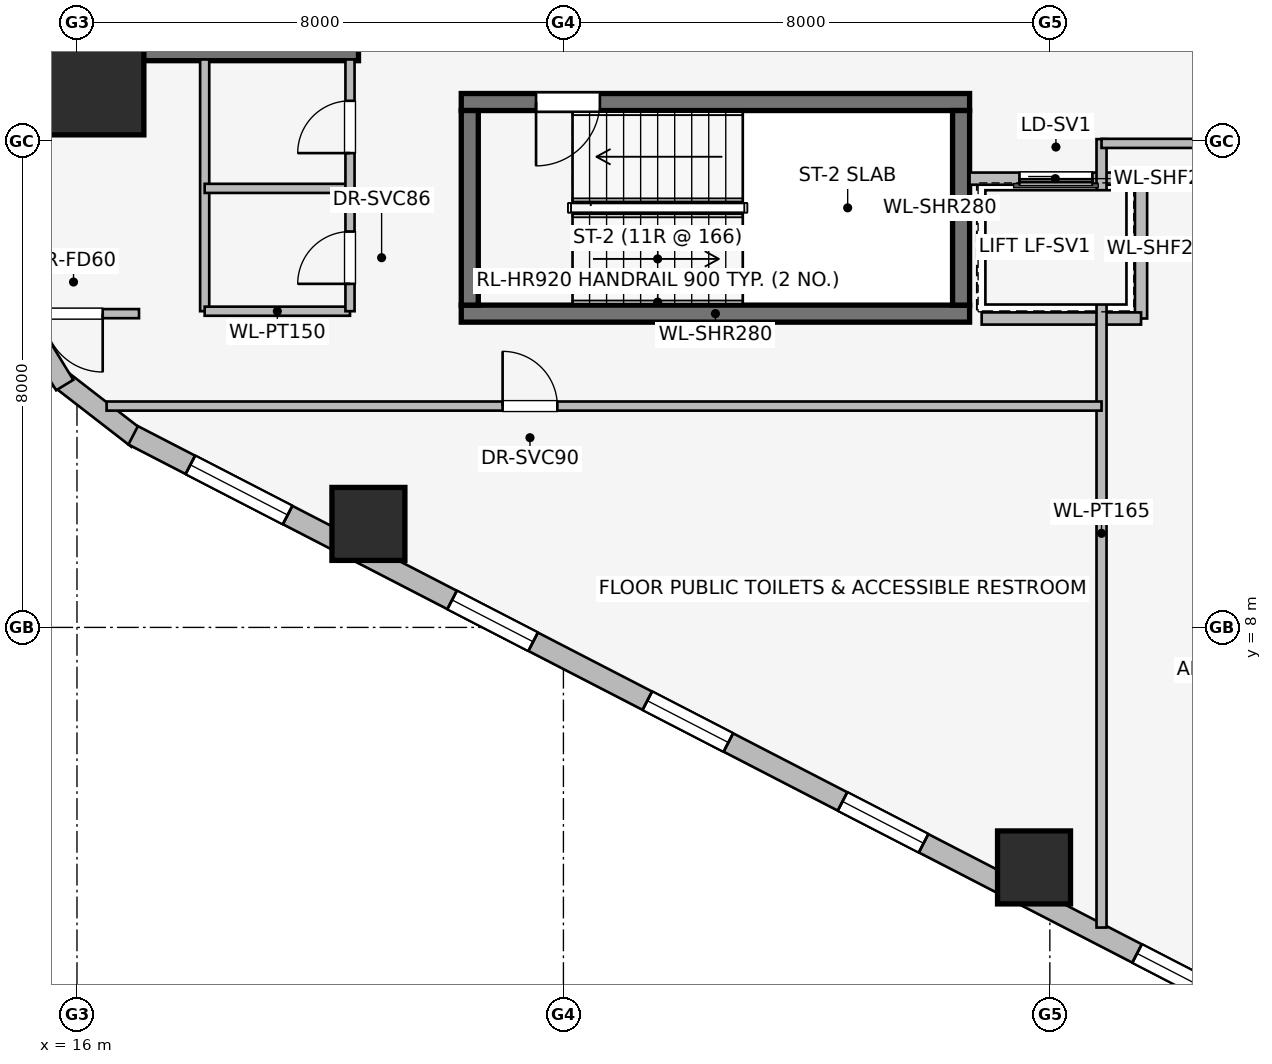
"""IFC4 building model, lengths in metres.
Left out: names, types, materials, properties, quantities, classifications, styles, units other than length and angle.
Written with IfcOpenShell. Run it as: python <this file> out.ifc"""

import sys

from ifc_helpers import new_model, si_unit, direction, frame, frame_2d, origin, origin_2d, place, context, subcontext, project, spatial, rectangle, extrude, element, fill, save


model = new_model("IFC4")
c1 = context("Model", 3, precision=1e-05, world=origin(), true_north=direction((0.0, 1.0)))
c2 = subcontext(c1, "Body", "Model", "MODEL_VIEW")
j1 = project(units=[si_unit("LENGTHUNIT", "METRE"), si_unit("PLANEANGLEUNIT", "RADIAN")], contexts=[c1])
p1 = place(None, origin())
s1 = spatial("IfcSite", under=j1, at=p1, CompositionType="ELEMENT")
p2 = place(p1, origin())
s2 = spatial("IfcBuilding", under=s1, at=p2, CompositionType="ELEMENT")
p3 = place(p2, frame((0.0, 0.0, 67.15)))
s3 = spatial("IfcBuildingStorey", under=s2, at=p3, CompositionType="ELEMENT", Elevation=67.15)
p4 = place(p3, frame((16.87, 17.46, 0.0), z_axis=(0.0, 0.0, 1.0), x_axis=(1.0, 0.0, 0.0)))
e1 = element("IfcWall", 1, at=p4, inside=s3, PredefinedType="SHEAR", context=c2, shape_type="SweptSolid", body=[
    extrude(rectangle(XDim=3.76, YDim=0.28, at=frame_2d((1.88, 0.0))), origin(), (0.0, 0.0, 1.0), 3.65),
])
p5 = place(p3, frame((22.32, 13.16, 0.0), z_axis=(0.0, 0.0, 1.0), x_axis=(1.0, 0.0, 0.0)))
e2 = element("IfcWall", 2, at=p5, inside=s3, PredefinedType="SHEAR", context=c2, shape_type="SweptSolid", body=[
    extrude(rectangle(XDim=8.36, YDim=0.28, at=frame_2d((4.18, 0.0))), origin(), (0.0, 0.0, 1.0), 3.65),
])
p6 = place(p3, frame((30.68, 16.64, 0.0), z_axis=(0.0, 0.0, 1.0), x_axis=(-1.0, 0.0, 0.0)))
e3 = element("IfcWall", 3, at=p6, inside=s3, PredefinedType="SHEAR", context=c2, shape_type="SweptSolid", body=[
    extrude(rectangle(XDim=8.36, YDim=0.28, at=frame_2d((4.18, 0.0))), origin(), (0.0, 0.0, 1.0), 3.65),
])
p7 = place(p6, frame((6.08, 0.0, 0.0)))
e4 = element("IfcOpeningElement", 4, at=p7, cuts=e3, PredefinedType="OPENING", context=c2, shape_type="SweptSolid", body=[
    extrude(rectangle(XDim=1.05, YDim=2.0, at=frame_2d((0.525, 1.0))), frame((0.0, 0.15, 0.0), z_axis=(0.0, -1.0, 0.0), x_axis=(1.0, 0.0, 0.0)), (0.0, 0.0, 1.0), 0.3),
])
for number, where, z_axis, x_axis in (
    (5, (22.46, 16.5, 0.0), (0.0, 0.0, 1.0), (0.0, -1.0, 0.0)),
    (6, (30.54, 13.3, 0.0), (0.0, 0.0, 1.0), (0.0, 1.0, 0.0)),
):
    element("IfcWall", number, at=place(p3, frame(where, z_axis=z_axis, x_axis=x_axis)), inside=s3, PredefinedType="SHEAR", context=c2, shape_type="SweptSolid", body=[
        extrude(rectangle(XDim=3.2, YDim=0.28, at=frame_2d((1.6, 0.0))), origin(), (0.0, 0.0, 1.0), 3.65),
    ])
p8 = place(p3, frame((16.3, 16.9, 0.0), z_axis=(0.0, 0.0, 1.0), x_axis=(1.0, 0.0, 0.0)))
e7 = element("IfcColumn", 7, at=p8, inside=s3, PredefinedType="COLUMN", context=c2, shape_type="SweptSolid", body=[
    extrude(rectangle(XDim=1.6, YDim=1.6, at=origin_2d()), origin(), (0.0, 0.0, 1.0), 3.65),
])
for number, where, z_axis, x_axis in (
    (8, (20.793, 9.702, 0.0), (0.0, 0.0, 1.0), (1.0, 0.0, 0.0)),
    (9, (31.74, 4.053, 0.0), (0.0, 0.0, 1.0), (1.0, 0.0, 0.0)),
):
    element("IfcColumn", number, at=place(p3, frame(where, z_axis=z_axis, x_axis=x_axis)), inside=s3, PredefinedType="COLUMN", context=c2, shape_type="SweptSolid", body=[
        extrude(rectangle(XDim=1.2, YDim=1.2, at=origin_2d()), origin(), (0.0, 0.0, 1.0), 3.65),
    ])
p9 = place(p3, frame((16.998, 11.099, 0.0), z_axis=(0.0, 0.0, 1.0), x_axis=(-0.790691856293, 0.61221433207, 0.0)))
e10 = element("IfcWall", 10, at=p9, inside=s3, PredefinedType="STANDARD", context=c2, shape_type="SweptSolid", body=[
    extrude(rectangle(XDim=1.676, YDim=0.33, at=frame_2d((0.838, 0.0))), origin(), (0.0, 0.0, 1.0), 3.39),
])
p10 = place(p3, frame((15.798, 11.985, 0.0), z_axis=(0.0, 0.0, 1.0), x_axis=(-0.520584129191, 0.853810379671, 0.0)))
e11 = element("IfcWall", 11, at=p10, inside=s3, PredefinedType="STANDARD", context=c2, shape_type="SweptSolid", body=[
    extrude(rectangle(XDim=1.677, YDim=0.33, at=frame_2d((0.838, 0.0))), origin(), (0.0, 0.0, 1.0), 3.39),
])
p11 = place(p3, frame((35.169, 1.743, 0.0), z_axis=(0.0, 0.0, 1.0), x_axis=(-0.888634413993, 0.458616264721, 0.0)))
e12 = element("IfcWall", 12, at=p11, inside=s3, PredefinedType="STANDARD", context=c2, shape_type="SweptSolid", body=[
    extrude(rectangle(XDim=20.531, YDim=0.34, at=frame_2d((10.266, 0.0))), origin(), (0.0, 0.0, 1.0), 2.684),
])
p12 = place(p11, frame((0.902, 0.0, 0.75)))
e13 = element("IfcOpeningElement", 13, at=p12, cuts=e12, PredefinedType="OPENING", context=c2, shape_type="SweptSolid", body=[
    extrude(rectangle(XDim=1.05, YDim=1.4, at=frame_2d((0.525, 0.7))), frame((0.0, 0.18, 0.0), z_axis=(0.0, -1.0, 0.0), x_axis=(1.0, 0.0, 0.0)), (0.0, 0.0, 1.0), 0.36),
])
p13 = place(p11, frame((5.903, 0.0, 0.75)))
e14 = element("IfcOpeningElement", 14, at=p13, cuts=e12, PredefinedType="OPENING", context=c2, shape_type="SweptSolid", body=[
    extrude(rectangle(XDim=1.5, YDim=1.5, at=frame_2d((0.75, 0.75))), frame((0.0, 0.18, 0.0), z_axis=(0.0, -1.0, 0.0), x_axis=(1.0, 0.0, 0.0)), (0.0, 0.0, 1.0), 0.36),
])
p14 = place(p11, frame((9.516, 0.0, 0.75)))
e15 = element("IfcOpeningElement", 15, at=p14, cuts=e12, PredefinedType="OPENING", context=c2, shape_type="SweptSolid", body=[
    extrude(rectangle(XDim=1.5, YDim=1.5, at=frame_2d((0.75, 0.75))), frame((0.0, 0.18, 0.0), z_axis=(0.0, -1.0, 0.0), x_axis=(1.0, 0.0, 0.0)), (0.0, 0.0, 1.0), 0.36),
])
p15 = place(p11, frame((13.129, 0.0, 0.75)))
e16 = element("IfcOpeningElement", 16, at=p15, cuts=e12, PredefinedType="OPENING", context=c2, shape_type="SweptSolid", body=[
    extrude(rectangle(XDim=1.5, YDim=1.5, at=frame_2d((0.75, 0.75))), frame((0.0, 0.18, 0.0), z_axis=(0.0, -1.0, 0.0), x_axis=(1.0, 0.0, 0.0)), (0.0, 0.0, 1.0), 0.36),
])
p16 = place(p11, frame((17.673, 0.0, 0.75)))
e17 = element("IfcOpeningElement", 17, at=p16, cuts=e12, PredefinedType="OPENING", context=c2, shape_type="SweptSolid", body=[
    extrude(rectangle(XDim=1.8, YDim=1.5, at=frame_2d((0.9, 0.75))), frame((0.0, 0.18, 0.0), z_axis=(0.0, -1.0, 0.0), x_axis=(1.0, 0.0, 0.0)), (0.0, 0.0, 1.0), 0.36),
])
p17 = place(p3, frame((33.5, 15.38, 0.0), z_axis=(0.0, 0.0, 1.0), x_axis=(-1.0, 0.0, 0.0)))
e18 = element("IfcWall", 18, at=p17, inside=s3, PredefinedType="PARTITIONING", context=c2, shape_type="SweptSolid", body=[
    extrude(rectangle(XDim=2.82, YDim=0.2, at=frame_2d((1.41, 0.0))), origin(), (0.0, 0.0, 1.0), 3.39),
])
p18 = place(p17, frame((0.8, 0.0, 0.0)))
e19 = element("IfcOpeningElement", 19, at=p18, cuts=e18, PredefinedType="OPENING", context=c2, shape_type="SweptSolid", body=[
    extrude(rectangle(XDim=1.2, YDim=2.2, at=frame_2d((0.6, 1.1))), frame((0.0, 0.11, 0.0), z_axis=(0.0, -1.0, 0.0), x_axis=(1.0, 0.0, 0.0)), (0.0, 0.0, 1.0), 0.22),
])
p19 = place(p3, frame((33.5, 13.08, 0.0), z_axis=(0.0, 0.0, 1.0), x_axis=(0.0, 1.0, 0.0)))
e20 = element("IfcWall", 20, at=p19, inside=s3, PredefinedType="PARTITIONING", context=c2, shape_type="SweptSolid", body=[
    extrude(rectangle(XDim=2.3, YDim=0.2, at=frame_2d((1.15, 0.0))), origin(), (0.0, 0.0, 1.0), 3.39),
])
p20 = place(p3, frame((30.879, 13.08, 0.0), z_axis=(0.0, 0.0, 1.0), x_axis=(1.0, 0.0, 0.0)))
e21 = element("IfcWall", 21, at=p20, inside=s3, PredefinedType="PARTITIONING", context=c2, shape_type="SweptSolid", body=[
    extrude(rectangle(XDim=2.621, YDim=0.2, at=frame_2d((1.311, 0.0))), origin(), (0.0, 0.0, 1.0), 3.39),
])
p21 = place(p3, frame((18.1, 17.34, 0.0), z_axis=(0.0, 0.0, 1.0), x_axis=(0.0, -1.0, 0.0)))
e22 = element("IfcWall", 22, at=p21, inside=s3, PredefinedType="PARTITIONING", context=c2, shape_type="SweptSolid", body=[
    extrude(rectangle(XDim=4.14, YDim=0.15, at=frame_2d((2.07, 0.0))), origin(), (0.0, 0.0, 1.0), 3.39),
])
for number, where, z_axis, x_axis in (
    (23, (18.1, 13.2, 0.0), (0.0, 0.0, 1.0), (1.0, 0.0, 0.0)),
    (24, (18.1, 15.22, 0.0), (0.0, 0.0, 1.0), (1.0, 0.0, 0.0)),
):
    element("IfcWall", number, at=place(p3, frame(where, z_axis=z_axis, x_axis=x_axis)), inside=s3, PredefinedType="PARTITIONING", context=c2, shape_type="SweptSolid", body=[
        extrude(rectangle(XDim=2.39, YDim=0.15, at=frame_2d((1.195, 0.0))), origin(), (0.0, 0.0, 1.0), 3.39),
    ])
p22 = place(p3, frame((20.49, 13.2, 0.0), z_axis=(0.0, 0.0, 1.0), x_axis=(0.0, 1.0, 0.0)))
e25 = element("IfcWall", 25, at=p22, inside=s3, PredefinedType="PARTITIONING", context=c2, shape_type="SweptSolid", body=[
    extrude(rectangle(XDim=4.14, YDim=0.15, at=frame_2d((2.07, 0.0))), origin(), (0.0, 0.0, 1.0), 3.39),
])
p23 = place(p22, frame((0.45, 0.0, 0.0)))
e26 = element("IfcOpeningElement", 26, at=p23, cuts=e25, PredefinedType="OPENING", context=c2, shape_type="SweptSolid", body=[
    extrude(rectangle(XDim=0.86, YDim=2.0, at=frame_2d((0.43, 1.0))), frame((0.0, 0.085, 0.0), z_axis=(0.0, -1.0, 0.0), x_axis=(1.0, 0.0, 0.0)), (0.0, 0.0, 1.0), 0.17),
])
p24 = place(p22, frame((2.6, 0.0, 0.0)))
e27 = element("IfcOpeningElement", 27, at=p24, cuts=e25, PredefinedType="OPENING", context=c2, shape_type="SweptSolid", body=[
    extrude(rectangle(XDim=0.86, YDim=2.0, at=frame_2d((0.43, 1.0))), frame((0.0, 0.085, 0.0), z_axis=(0.0, -1.0, 0.0), x_axis=(1.0, 0.0, 0.0)), (0.0, 0.0, 1.0), 0.17),
])
p25 = place(p3, frame((32.85, 3.064, 0.0), z_axis=(0.0, 0.0, 1.0), x_axis=(0.0, 1.0, 0.0)))
e28 = element("IfcWall", 28, at=p25, inside=s3, PredefinedType="PARTITIONING", context=c2, shape_type="SweptSolid", body=[
    extrude(rectangle(XDim=12.966, YDim=0.165, at=frame_2d((6.483, 0.0))), origin(), (0.0, 0.0, 1.0), 3.39),
])
p26 = place(p3, frame((16.487, 11.64, 0.0), z_axis=(0.0, 0.0, 1.0), x_axis=(1.0, 0.0, 0.0)))
e29 = element("IfcWall", 29, at=p26, inside=s3, PredefinedType="PARTITIONING", context=c2, shape_type="SweptSolid", body=[
    extrude(rectangle(XDim=16.363, YDim=0.15, at=frame_2d((8.182, 0.0))), origin(), (0.0, 0.0, 1.0), 3.39),
])
p27 = place(p26, frame((6.513, 0.0, 0.0)))
e30 = element("IfcOpeningElement", 30, at=p27, cuts=e29, PredefinedType="OPENING", context=c2, shape_type="SweptSolid", body=[
    extrude(rectangle(XDim=0.9, YDim=2.0, at=frame_2d((0.45, 1.0))), frame((0.0, 0.085, 0.0), z_axis=(0.0, -1.0, 0.0), x_axis=(1.0, 0.0, 0.0)), (0.0, 0.0, 1.0), 0.17),
])
p28 = place(p3, frame((17.02, 13.16, 0.0), z_axis=(0.0, 0.0, 1.0), x_axis=(-1.0, 0.0, 0.0)))
e31 = element("IfcWall", 31, at=p28, inside=s3, PredefinedType="PARTITIONING", context=c2, shape_type="SweptSolid", body=[
    extrude(rectangle(XDim=2.12, YDim=0.15, at=frame_2d((1.06, 0.0))), origin(), (0.0, 0.0, 1.0), 3.39),
])
p29 = place(p28, frame((0.597, 0.0, 0.0)))
e32 = element("IfcOpeningElement", 32, at=p29, cuts=e31, PredefinedType="OPENING", context=c2, shape_type="SweptSolid", body=[
    extrude(rectangle(XDim=0.96, YDim=2.0, at=frame_2d((0.48, 1.0))), frame((0.0, 0.085, 0.0), z_axis=(0.0, -1.0, 0.0), x_axis=(1.0, 0.0, 0.0)), (0.0, 0.0, 1.0), 0.17),
])
p30 = place(p3, frame((32.85, 15.96, 0.0), z_axis=(0.0, 0.0, 1.0), x_axis=(1.0, 0.0, 0.0)))
e33 = element("IfcWall", 33, at=p30, inside=s3, PredefinedType="PARTITIONING", context=c2, shape_type="SweptSolid", body=[
    extrude(rectangle(XDim=6.542, YDim=0.15, at=frame_2d((3.271, 0.0))), origin(), (0.0, 0.0, 1.0), 3.39),
])
p31 = place(p30, frame((2.791, 0.0, 0.0)))
e34 = element("IfcOpeningElement", 34, at=p31, cuts=e33, PredefinedType="OPENING", context=c2, shape_type="SweptSolid", body=[
    extrude(rectangle(XDim=0.96, YDim=2.0, at=frame_2d((0.48, 1.0))), frame((0.0, 0.085, 0.0), z_axis=(0.0, -1.0, 0.0), x_axis=(1.0, 0.0, 0.0)), (0.0, 0.0, 1.0), 0.17),
])
p32 = place(p12, origin())
e35 = element("IfcWindow", 35, at=p32, inside=s3, PartitioningType="SINGLE_PANEL", PredefinedType="WINDOW", context=c2, shape_type="SweptSolid", body=[
    extrude(rectangle(XDim=1.05, YDim=1.4, at=frame_2d((0.525, 0.7))), frame((0.0, 0.03, 0.0), z_axis=(0.0, -1.0, 0.0), x_axis=(1.0, 0.0, 0.0)), (0.0, 0.0, 1.0), 0.06),
])
fill(e13, e35)
p33 = place(p13, origin())
e36 = element("IfcWindow", 36, at=p33, inside=s3, PartitioningType="SINGLE_PANEL", PredefinedType="WINDOW", context=c2, shape_type="SweptSolid", body=[
    extrude(rectangle(XDim=1.5, YDim=1.5, at=frame_2d((0.75, 0.75))), frame((0.0, 0.03, 0.0), z_axis=(0.0, -1.0, 0.0), x_axis=(1.0, 0.0, 0.0)), (0.0, 0.0, 1.0), 0.06),
])
fill(e14, e36)
p34 = place(p14, origin())
e37 = element("IfcWindow", 37, at=p34, inside=s3, PartitioningType="SINGLE_PANEL", PredefinedType="WINDOW", context=c2, shape_type="SweptSolid", body=[
    extrude(rectangle(XDim=1.5, YDim=1.5, at=frame_2d((0.75, 0.75))), frame((0.0, 0.03, 0.0), z_axis=(0.0, -1.0, 0.0), x_axis=(1.0, 0.0, 0.0)), (0.0, 0.0, 1.0), 0.06),
])
fill(e15, e37)
p35 = place(p15, origin())
e38 = element("IfcWindow", 38, at=p35, inside=s3, PartitioningType="SINGLE_PANEL", PredefinedType="WINDOW", context=c2, shape_type="SweptSolid", body=[
    extrude(rectangle(XDim=1.5, YDim=1.5, at=frame_2d((0.75, 0.75))), frame((0.0, 0.03, 0.0), z_axis=(0.0, -1.0, 0.0), x_axis=(1.0, 0.0, 0.0)), (0.0, 0.0, 1.0), 0.06),
])
fill(e16, e38)
p36 = place(p16, origin())
e39 = element("IfcWindow", 39, at=p36, inside=s3, PartitioningType="SINGLE_PANEL", PredefinedType="WINDOW", context=c2, shape_type="SweptSolid", body=[
    extrude(rectangle(XDim=1.8, YDim=1.5, at=frame_2d((0.9, 0.75))), frame((0.0, 0.03, 0.0), z_axis=(0.0, -1.0, 0.0), x_axis=(1.0, 0.0, 0.0)), (0.0, 0.0, 1.0), 0.06),
])
fill(e17, e39)
p37 = place(p7, origin())
e40 = element("IfcDoor", 40, at=p37, inside=s3, OperationType="SINGLE_SWING_RIGHT", PredefinedType="DOOR", context=c2, shape_type="SweptSolid", body=[
    extrude(rectangle(XDim=1.05, YDim=2.0, at=frame_2d((0.525, 1.0))), frame((0.0, 0.025, 0.0), z_axis=(0.0, -1.0, 0.0), x_axis=(1.0, 0.0, 0.0)), (0.0, 0.0, 1.0), 0.05),
])
fill(e4, e40)
p38 = place(p18, origin())
e41 = element("IfcDoor", 41, at=p38, inside=s3, OperationType="SLIDING_TO_RIGHT", PredefinedType="DOOR", context=c2, shape_type="SweptSolid", body=[
    extrude(rectangle(XDim=1.2, YDim=2.2, at=frame_2d((0.6, 1.1))), frame((0.0, 0.025, 0.0), z_axis=(0.0, -1.0, 0.0), x_axis=(1.0, 0.0, 0.0)), (0.0, 0.0, 1.0), 0.05),
])
fill(e19, e41)
p39 = place(p23, origin())
e42 = element("IfcDoor", 42, at=p39, inside=s3, OperationType="SINGLE_SWING_LEFT", PredefinedType="DOOR", context=c2, shape_type="SweptSolid", body=[
    extrude(rectangle(XDim=0.86, YDim=2.0, at=frame_2d((0.43, 1.0))), frame((0.0, 0.025, 0.0), z_axis=(0.0, -1.0, 0.0), x_axis=(1.0, 0.0, 0.0)), (0.0, 0.0, 1.0), 0.05),
])
fill(e26, e42)
p40 = place(p24, origin())
e43 = element("IfcDoor", 43, at=p40, inside=s3, OperationType="SINGLE_SWING_LEFT", PredefinedType="DOOR", context=c2, shape_type="SweptSolid", body=[
    extrude(rectangle(XDim=0.86, YDim=2.0, at=frame_2d((0.43, 1.0))), frame((0.0, 0.025, 0.0), z_axis=(0.0, -1.0, 0.0), x_axis=(1.0, 0.0, 0.0)), (0.0, 0.0, 1.0), 0.05),
])
fill(e27, e43)
p41 = place(p27, origin())
e44 = element("IfcDoor", 44, at=p41, inside=s3, OperationType="SINGLE_SWING_LEFT", PredefinedType="DOOR", context=c2, shape_type="SweptSolid", body=[
    extrude(rectangle(XDim=0.9, YDim=2.0, at=frame_2d((0.45, 1.0))), frame((0.0, 0.025, 0.0), z_axis=(0.0, -1.0, 0.0), x_axis=(1.0, 0.0, 0.0)), (0.0, 0.0, 1.0), 0.05),
])
fill(e30, e44)
p42 = place(p29, origin())
e45 = element("IfcDoor", 45, at=p42, inside=s3, OperationType="SINGLE_SWING_LEFT", PredefinedType="DOOR", context=c2, shape_type="SweptSolid", body=[
    extrude(rectangle(XDim=0.96, YDim=2.0, at=frame_2d((0.48, 1.0))), frame((0.0, 0.025, 0.0), z_axis=(0.0, -1.0, 0.0), x_axis=(1.0, 0.0, 0.0)), (0.0, 0.0, 1.0), 0.05),
])
fill(e32, e45)
save(model, sys.argv[1])
